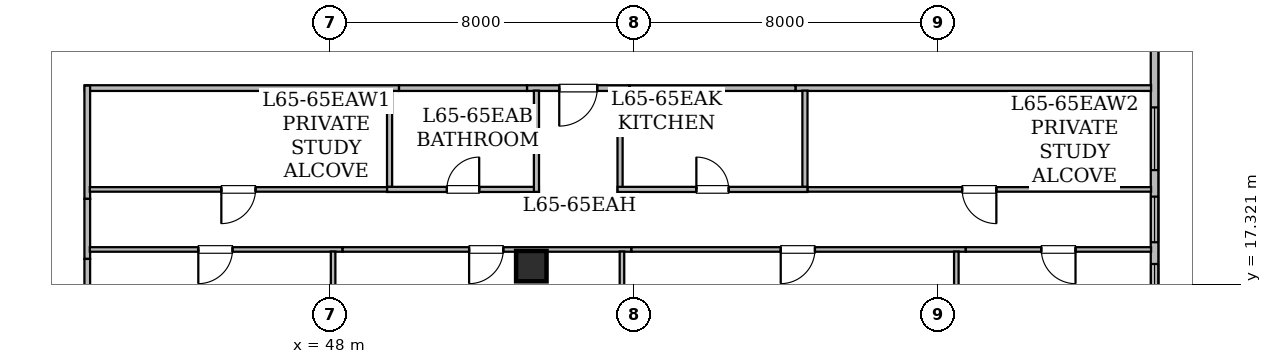
"""IFC4 building model, lengths in metres.
Left out: names, types, materials, properties, quantities, classifications, styles, units other than length and angle.
Written with IfcOpenShell. Run it as: python <this file> out.ifc"""

import sys

from ifc_helpers import new_model, si_unit, direction, frame, frame_2d, origin, origin_2d, place, context, subcontext, project, spatial, rectangle, hollow_rectangle, extrude, element, fill, save


model = new_model("IFC4")
c1 = context("Model", 3, precision=1e-05, world=origin(), true_north=direction((0.0, 1.0)))
c2 = subcontext(c1, "Body", "Model", "MODEL_VIEW")
j1 = project(units=[si_unit("LENGTHUNIT", "METRE"), si_unit("PLANEANGLEUNIT", "RADIAN")], contexts=[c1])
p1 = place(None, origin())
s1 = spatial("IfcSite", under=j1, at=p1, CompositionType="ELEMENT")
p2 = place(p1, origin())
s2 = spatial("IfcBuilding", under=s1, at=p2, CompositionType="ELEMENT")
p3 = place(p2, frame((0.0, 0.0, 253.7)))
s3 = spatial("IfcBuildingStorey", under=s2, at=p3, CompositionType="ELEMENT", Elevation=253.7)
for number, where, z_axis, x_axis in (
    (1, (67.2, 21.425, 0.0), (0.0, 0.0, 1.0), (1.0, 0.0, 0.0)),
    (2, (53.3, 17.8, 0.0), (0.0, 0.0, 1.0), (1.0, 0.0, 0.0)),
):
    element("IfcColumn", number, at=place(p3, frame(where, z_axis=z_axis, x_axis=x_axis)), inside=s3, PredefinedType="COLUMN", context=c2, shape_type="SweptSolid", body=[
        extrude(hollow_rectangle(XDim=0.8, YDim=0.8, WallThickness=0.04, at=origin_2d()), origin(), (0.0, 0.0, 1.0), 3.65),
    ])
p4 = place(p3, frame((69.7, 24.916, 0.0), z_axis=(0.0, 0.0, 1.0), x_axis=(0.0, -1.0, 0.0)))
e3 = element("IfcWall", 3, at=p4, inside=s3, PredefinedType="STANDARD", context=c2, shape_type="SweptSolid", body=[
    extrude(rectangle(XDim=8.875, YDim=0.2, at=frame_2d((4.438, 0.0))), origin(), (0.0, 0.0, 1.0), 3.43),
])
p5 = place(p4, frame((2.939, 0.0, 0.85)))
e4 = element("IfcOpeningElement", 4, at=p5, cuts=e3, PredefinedType="OPENING", context=c2, shape_type="SweptSolid", body=[
    extrude(rectangle(XDim=1.65, YDim=1.55, at=frame_2d((0.825, 0.775))), frame((0.0, 0.11, 0.0), z_axis=(0.0, -1.0, 0.0), x_axis=(1.0, 0.0, 0.0)), (0.0, 0.0, 1.0), 0.22),
])
p6 = place(p4, frame((5.287, 0.0, 0.8)))
e5 = element("IfcOpeningElement", 5, at=p6, cuts=e3, PredefinedType="OPENING", context=c2, shape_type="SweptSolid", body=[
    extrude(rectangle(XDim=1.2, YDim=1.5, at=frame_2d((0.6, 0.75))), frame((0.0, 0.11, 0.0), z_axis=(0.0, -1.0, 0.0), x_axis=(1.0, 0.0, 0.0)), (0.0, 0.0, 1.0), 0.22),
])
p7 = place(p4, frame((7.059, 0.0, 0.85)))
e6 = element("IfcOpeningElement", 6, at=p7, cuts=e3, PredefinedType="OPENING", context=c2, shape_type="SweptSolid", body=[
    extrude(rectangle(XDim=1.65, YDim=1.55, at=frame_2d((0.825, 0.775))), frame((0.0, 0.11, 0.0), z_axis=(0.0, -1.0, 0.0), x_axis=(1.0, 0.0, 0.0)), (0.0, 0.0, 1.0), 0.22),
])
p8 = place(p3, frame((49.819, 22.485, 0.0), z_axis=(0.0, 0.0, 1.0), x_axis=(-1.0, 0.0, 0.0)))
e7 = element("IfcWall", 7, at=p8, inside=s3, PredefinedType="STANDARD", context=c2, shape_type="SweptSolid", body=[
    extrude(rectangle(XDim=8.269, YDim=0.15, at=frame_2d((4.135, 0.0))), origin(), (0.0, 0.0, 1.0), 3.43),
])
p9 = place(p3, frame((41.615, 22.55, 0.0), z_axis=(0.0, 0.0, 1.0), x_axis=(0.0, -1.0, 0.0)))
e8 = element("IfcWall", 8, at=p9, inside=s3, PredefinedType="STANDARD", context=c2, shape_type="SweptSolid", body=[
    extrude(rectangle(XDim=2.98, YDim=0.15, at=frame_2d((1.49, 0.0))), origin(), (0.0, 0.0, 1.0), 3.43),
])
p10 = place(p3, frame((69.608, 22.485, 0.0), z_axis=(0.0, 0.0, 1.0), x_axis=(-1.0, 0.0, 0.0)))
e9 = element("IfcWall", 9, at=p10, inside=s3, PredefinedType="STANDARD", context=c2, shape_type="SweptSolid", body=[
    extrude(rectangle(XDim=9.357, YDim=0.15, at=frame_2d((4.678, 0.0))), origin(), (0.0, 0.0, 1.0), 2.887),
])
p11 = place(p3, frame((55.884, 22.485, 0.0), z_axis=(0.0, 0.0, 1.0), x_axis=(-1.0, 0.0, 0.0)))
e10 = element("IfcWall", 10, at=p11, inside=s3, PredefinedType="STANDARD", context=c2, shape_type="SweptSolid", body=[
    extrude(rectangle(XDim=2.698, YDim=0.15, at=frame_2d((1.349, 0.0))), origin(), (0.0, 0.0, 1.0), 2.725),
])
p12 = place(p11, frame((0.849, 0.0, 0.0)))
e11 = element("IfcOpeningElement", 11, at=p12, cuts=e10, PredefinedType="OPENING", context=c2, shape_type="SweptSolid", body=[
    extrude(rectangle(XDim=1.0, YDim=2.15, at=frame_2d((0.5, 1.075))), frame((0.0, 0.085, 0.0), z_axis=(0.0, -1.0, 0.0), x_axis=(1.0, 0.0, 0.0)), (0.0, 0.0, 1.0), 0.17),
])
p13 = place(p3, frame((41.615, 19.57, 0.0), z_axis=(0.0, 0.0, 1.0), x_axis=(0.0, -1.0, 0.0)))
e12 = element("IfcWall", 12, at=p13, inside=s3, PredefinedType="STANDARD", context=c2, shape_type="SweptSolid", body=[
    extrude(rectangle(XDim=1.58, YDim=0.15, at=frame_2d((0.79, 0.0))), origin(), (0.0, 0.0, 1.0), 2.725),
])
p14 = place(p3, frame((53.186, 22.485, 0.0), z_axis=(0.0, 0.0, 1.0), x_axis=(-1.0, 0.0, 0.0)))
e13 = element("IfcWall", 13, at=p14, inside=s3, PredefinedType="STANDARD", context=c2, shape_type="SweptSolid", body=[
    extrude(rectangle(XDim=3.367, YDim=0.15, at=frame_2d((1.684, 0.0))), origin(), (0.0, 0.0, 1.0), 2.725),
])
p15 = place(p3, frame((60.251, 22.485, 0.0), z_axis=(0.0, 0.0, 1.0), x_axis=(-1.0, 0.0, 0.0)))
e14 = element("IfcWall", 14, at=p15, inside=s3, PredefinedType="STANDARD", context=c2, shape_type="SweptSolid", body=[
    extrude(rectangle(XDim=4.367, YDim=0.15, at=frame_2d((2.184, 0.0))), origin(), (0.0, 0.0, 1.0), 3.43),
])
p16 = place(p3, frame((41.615, 17.99, 0.0), z_axis=(0.0, 0.0, 1.0), x_axis=(0.0, -1.0, 0.0)))
e15 = element("IfcWall", 15, at=p16, inside=s3, PredefinedType="STANDARD", context=c2, shape_type="SweptSolid", body=[
    extrude(rectangle(XDim=1.09, YDim=0.15, at=frame_2d((0.545, 0.0))), origin(), (0.0, 0.0, 1.0), 2.725),
])
p17 = place(p3, frame((49.505, 19.819, 0.0), z_axis=(0.0, 0.0, 1.0), x_axis=(-1.0, 0.0, 0.0)))
e16 = element("IfcWall", 16, at=p17, inside=s3, PredefinedType="PARTITIONING", context=c2, shape_type="SweptSolid", body=[
    extrude(rectangle(XDim=7.823, YDim=0.12, at=frame_2d((3.912, 0.0))), origin(), (0.0, 0.0, 1.0), 3.43),
])
p18 = place(p17, frame((3.462, 0.0, 0.0)))
e17 = element("IfcOpeningElement", 17, at=p18, cuts=e16, PredefinedType="OPENING", context=c2, shape_type="SweptSolid", body=[
    extrude(rectangle(XDim=0.9, YDim=2.1, at=frame_2d((0.45, 1.05))), frame((0.0, 0.07, 0.0), z_axis=(0.0, -1.0, 0.0), x_axis=(1.0, 0.0, 0.0)), (0.0, 0.0, 1.0), 0.14),
])
p19 = place(p3, frame((49.57, 22.418, 0.0), z_axis=(0.0, 0.0, 1.0), x_axis=(0.0, -1.0, 0.0)))
e18 = element("IfcWall", 18, at=p19, inside=s3, PredefinedType="PARTITIONING", context=c2, shape_type="SweptSolid", body=[
    extrude(rectangle(XDim=2.534, YDim=0.135, at=frame_2d((1.267, 0.0))), origin(), (0.0, 0.0, 1.0), 3.43),
])
p20 = place(p3, frame((69.608, 19.819, 0.0), z_axis=(0.0, 0.0, 1.0), x_axis=(-1.0, 0.0, 0.0)))
e19 = element("IfcWall", 19, at=p20, inside=s3, PredefinedType="PARTITIONING", context=c2, shape_type="SweptSolid", body=[
    extrude(rectangle(XDim=9.043, YDim=0.12, at=frame_2d((4.521, 0.0))), origin(), (0.0, 0.0, 1.0), 2.725),
])
p21 = place(p20, frame((4.071, 0.0, 0.0)))
e20 = element("IfcOpeningElement", 20, at=p21, cuts=e19, PredefinedType="OPENING", context=c2, shape_type="SweptSolid", body=[
    extrude(rectangle(XDim=0.9, YDim=2.1, at=frame_2d((0.45, 1.05))), frame((0.0, 0.07, 0.0), z_axis=(0.0, -1.0, 0.0), x_axis=(1.0, 0.0, 0.0)), (0.0, 0.0, 1.0), 0.14),
])
p22 = place(p3, frame((60.5, 19.884, 0.0), z_axis=(0.0, 0.0, 1.0), x_axis=(0.0, 1.0, 0.0)))
e21 = element("IfcWall", 21, at=p22, inside=s3, PredefinedType="PARTITIONING", context=c2, shape_type="SweptSolid", body=[
    extrude(rectangle(XDim=2.534, YDim=0.135, at=frame_2d((1.267, 0.0))), origin(), (0.0, 0.0, 1.0), 3.43),
])
p23 = place(p3, frame((49.505, 19.819, 0.0), z_axis=(0.0, 0.0, 1.0), x_axis=(1.0, 0.0, 0.0)))
e22 = element("IfcWall", 22, at=p23, inside=s3, PredefinedType="PARTITIONING", context=c2, shape_type="SweptSolid", body=[
    extrude(rectangle(XDim=3.995, YDim=0.135, at=frame_2d((1.998, 0.0))), origin(), (0.0, 0.0, 1.0), 2.725),
])
p24 = place(p23, frame((1.573, 0.0, 0.0)))
e23 = element("IfcOpeningElement", 23, at=p24, cuts=e22, PredefinedType="OPENING", context=c2, shape_type="SweptSolid", body=[
    extrude(rectangle(XDim=0.85, YDim=2.1, at=frame_2d((0.425, 1.05))), frame((0.0, 0.077, 0.0), z_axis=(0.0, -1.0, 0.0), x_axis=(1.0, 0.0, 0.0)), (0.0, 0.0, 1.0), 0.155),
])
p25 = place(p3, frame((53.435, 19.754, 0.0), z_axis=(0.0, 0.0, 1.0), x_axis=(0.0, 1.0, 0.0)))
e24 = element("IfcWall", 24, at=p25, inside=s3, PredefinedType="PARTITIONING", context=c2, shape_type="SweptSolid", body=[
    extrude(rectangle(XDim=2.664, YDim=0.135, at=frame_2d((1.332, 0.0))), origin(), (0.0, 0.0, 1.0), 2.725),
])
p26 = place(p3, frame((55.635, 22.418, 0.0), z_axis=(0.0, 0.0, 1.0), x_axis=(0.0, -1.0, 0.0)))
e25 = element("IfcWall", 25, at=p26, inside=s3, PredefinedType="PARTITIONING", context=c2, shape_type="SweptSolid", body=[
    extrude(rectangle(XDim=2.664, YDim=0.135, at=frame_2d((1.332, 0.0))), origin(), (0.0, 0.0, 1.0), 3.43),
])
p27 = place(p3, frame((55.57, 19.819, 0.0), z_axis=(0.0, 0.0, 1.0), x_axis=(1.0, 0.0, 0.0)))
e26 = element("IfcWall", 26, at=p27, inside=s3, PredefinedType="PARTITIONING", context=c2, shape_type="SweptSolid", body=[
    extrude(rectangle(XDim=4.995, YDim=0.135, at=frame_2d((2.498, 0.0))), origin(), (0.0, 0.0, 1.0), 2.725),
])
p28 = place(p27, frame((2.073, 0.0, 0.0)))
e27 = element("IfcOpeningElement", 27, at=p28, cuts=e26, PredefinedType="OPENING", context=c2, shape_type="SweptSolid", body=[
    extrude(rectangle(XDim=0.85, YDim=2.1, at=frame_2d((0.425, 1.05))), frame((0.0, 0.077, 0.0), z_axis=(0.0, -1.0, 0.0), x_axis=(1.0, 0.0, 0.0)), (0.0, 0.0, 1.0), 0.155),
])
p29 = place(p3, frame((48.333, 18.239, 0.0), z_axis=(0.0, 0.0, 1.0), x_axis=(-1.0, 0.0, 0.0)))
e28 = element("IfcWall", 28, at=p29, inside=s3, PredefinedType="PARTITIONING", context=c2, shape_type="SweptSolid", body=[
    extrude(rectangle(XDim=6.651, YDim=0.12, at=frame_2d((3.326, 0.0))), origin(), (0.0, 0.0, 1.0), 2.725),
])
p30 = place(p29, frame((2.896, 0.0, 0.0)))
e29 = element("IfcOpeningElement", 29, at=p30, cuts=e28, PredefinedType="OPENING", context=c2, shape_type="SweptSolid", body=[
    extrude(rectangle(XDim=0.9, YDim=2.1, at=frame_2d((0.45, 1.05))), frame((0.0, 0.07, 0.0), z_axis=(0.0, -1.0, 0.0), x_axis=(1.0, 0.0, 0.0)), (0.0, 0.0, 1.0), 0.14),
])
p31 = place(p3, frame((55.934, 18.239, 0.0), z_axis=(0.0, 0.0, 1.0), x_axis=(-1.0, 0.0, 0.0)))
e30 = element("IfcWall", 30, at=p31, inside=s3, PredefinedType="PARTITIONING", context=c2, shape_type="SweptSolid", body=[
    extrude(rectangle(XDim=7.601, YDim=0.12, at=frame_2d((3.801, 0.0))), origin(), (0.0, 0.0, 1.0), 2.725),
])
p32 = place(p31, frame((3.371, 0.0, 0.0)))
e31 = element("IfcOpeningElement", 31, at=p32, cuts=e30, PredefinedType="OPENING", context=c2, shape_type="SweptSolid", body=[
    extrude(rectangle(XDim=0.9, YDim=2.1, at=frame_2d((0.45, 1.05))), frame((0.0, 0.07, 0.0), z_axis=(0.0, -1.0, 0.0), x_axis=(1.0, 0.0, 0.0)), (0.0, 0.0, 1.0), 0.14),
])
p33 = place(p3, frame((64.733, 18.239, 0.0), z_axis=(0.0, 0.0, 1.0), x_axis=(-1.0, 0.0, 0.0)))
e32 = element("IfcWall", 32, at=p33, inside=s3, PredefinedType="PARTITIONING", context=c2, shape_type="SweptSolid", body=[
    extrude(rectangle(XDim=8.799, YDim=0.12, at=frame_2d((4.399, 0.0))), origin(), (0.0, 0.0, 1.0), 2.725),
])
p34 = place(p33, frame((3.97, 0.0, 0.0)))
e33 = element("IfcOpeningElement", 33, at=p34, cuts=e32, PredefinedType="OPENING", context=c2, shape_type="SweptSolid", body=[
    extrude(rectangle(XDim=0.9, YDim=2.1, at=frame_2d((0.45, 1.05))), frame((0.0, 0.07, 0.0), z_axis=(0.0, -1.0, 0.0), x_axis=(1.0, 0.0, 0.0)), (0.0, 0.0, 1.0), 0.14),
])
p35 = place(p3, frame((69.608, 18.239, 0.0), z_axis=(0.0, 0.0, 1.0), x_axis=(-1.0, 0.0, 0.0)))
e34 = element("IfcWall", 34, at=p35, inside=s3, PredefinedType="PARTITIONING", context=c2, shape_type="SweptSolid", body=[
    extrude(rectangle(XDim=4.875, YDim=0.12, at=frame_2d((2.438, 0.0))), origin(), (0.0, 0.0, 1.0), 2.887),
])
p36 = place(p35, frame((1.988, 0.0, 0.0)))
e35 = element("IfcOpeningElement", 35, at=p36, cuts=e34, PredefinedType="OPENING", context=c2, shape_type="SweptSolid", body=[
    extrude(rectangle(XDim=0.9, YDim=2.1, at=frame_2d((0.45, 1.05))), frame((0.0, 0.07, 0.0), z_axis=(0.0, -1.0, 0.0), x_axis=(1.0, 0.0, 0.0)), (0.0, 0.0, 1.0), 0.14),
])
for number, where, z_axis, x_axis in (
    (36, (48.084, 18.185, 0.0), (0.0, 0.0, 1.0), (0.0, -1.0, 0.0)),
    (37, (55.685, 18.185, 0.0), (0.0, 0.0, 1.0), (0.0, -1.0, 0.0)),
):
    element("IfcWall", number, at=place(p3, frame(where, z_axis=z_axis, x_axis=x_axis)), inside=s3, PredefinedType="PARTITIONING", context=c2, shape_type="SweptSolid", body=[
        extrude(rectangle(XDim=5.993, YDim=0.12, at=frame_2d((2.997, 0.0))), origin(), (0.0, 0.0, 1.0), 2.725),
    ])
p37 = place(p3, frame((64.484, 18.185, 0.0), z_axis=(0.0, 0.0, 1.0), x_axis=(0.0, -1.0, 0.0)))
e38 = element("IfcWall", 38, at=p37, inside=s3, PredefinedType="PARTITIONING", context=c2, shape_type="SweptSolid", body=[
    extrude(rectangle(XDim=5.993, YDim=0.12, at=frame_2d((2.997, 0.0))), origin(), (0.0, 0.0, 1.0), 2.887),
])
p38 = place(p5, origin())
e39 = element("IfcWindow", 39, at=p38, inside=s3, PartitioningType="SINGLE_PANEL", PredefinedType="WINDOW", context=c2, shape_type="SweptSolid", body=[
    extrude(rectangle(XDim=1.65, YDim=1.55, at=frame_2d((0.825, 0.775))), frame((0.0, 0.03, 0.0), z_axis=(0.0, -1.0, 0.0), x_axis=(1.0, 0.0, 0.0)), (0.0, 0.0, 1.0), 0.06),
])
fill(e4, e39)
p39 = place(p6, origin())
e40 = element("IfcWindow", 40, at=p39, inside=s3, PartitioningType="SINGLE_PANEL", PredefinedType="WINDOW", context=c2, shape_type="SweptSolid", body=[
    extrude(rectangle(XDim=1.2, YDim=1.5, at=frame_2d((0.6, 0.75))), frame((0.0, 0.03, 0.0), z_axis=(0.0, -1.0, 0.0), x_axis=(1.0, 0.0, 0.0)), (0.0, 0.0, 1.0), 0.06),
])
fill(e5, e40)
p40 = place(p7, origin())
e41 = element("IfcWindow", 41, at=p40, inside=s3, PartitioningType="SINGLE_PANEL", PredefinedType="WINDOW", context=c2, shape_type="SweptSolid", body=[
    extrude(rectangle(XDim=1.65, YDim=1.55, at=frame_2d((0.825, 0.775))), frame((0.0, 0.03, 0.0), z_axis=(0.0, -1.0, 0.0), x_axis=(1.0, 0.0, 0.0)), (0.0, 0.0, 1.0), 0.06),
])
fill(e6, e41)
p41 = place(p12, origin())
e42 = element("IfcDoor", 42, at=p41, inside=s3, OperationType="SINGLE_SWING_RIGHT", PredefinedType="DOOR", context=c2, shape_type="SweptSolid", body=[
    extrude(rectangle(XDim=1.0, YDim=2.15, at=frame_2d((0.5, 1.075))), frame((0.0, 0.025, 0.0), z_axis=(0.0, -1.0, 0.0), x_axis=(1.0, 0.0, 0.0)), (0.0, 0.0, 1.0), 0.05),
])
fill(e11, e42)
p42 = place(p18, origin())
e43 = element("IfcDoor", 43, at=p42, inside=s3, OperationType="SINGLE_SWING_RIGHT", PredefinedType="DOOR", context=c2, shape_type="SweptSolid", body=[
    extrude(rectangle(XDim=0.9, YDim=2.1, at=frame_2d((0.45, 1.05))), frame((0.0, 0.025, 0.0), z_axis=(0.0, -1.0, 0.0), x_axis=(1.0, 0.0, 0.0)), (0.0, 0.0, 1.0), 0.05),
])
fill(e17, e43)
p43 = place(p21, origin())
e44 = element("IfcDoor", 44, at=p43, inside=s3, OperationType="SINGLE_SWING_LEFT", PredefinedType="DOOR", context=c2, shape_type="SweptSolid", body=[
    extrude(rectangle(XDim=0.9, YDim=2.1, at=frame_2d((0.45, 1.05))), frame((0.0, 0.025, 0.0), z_axis=(0.0, -1.0, 0.0), x_axis=(1.0, 0.0, 0.0)), (0.0, 0.0, 1.0), 0.05),
])
fill(e20, e44)
p44 = place(p24, origin())
e45 = element("IfcDoor", 45, at=p44, inside=s3, OperationType="SINGLE_SWING_RIGHT", PredefinedType="DOOR", context=c2, shape_type="SweptSolid", body=[
    extrude(rectangle(XDim=0.85, YDim=2.1, at=frame_2d((0.425, 1.05))), frame((0.0, 0.025, 0.0), z_axis=(0.0, -1.0, 0.0), x_axis=(1.0, 0.0, 0.0)), (0.0, 0.0, 1.0), 0.05),
])
fill(e23, e45)
p45 = place(p28, origin())
e46 = element("IfcDoor", 46, at=p45, inside=s3, OperationType="SINGLE_SWING_LEFT", PredefinedType="DOOR", context=c2, shape_type="SweptSolid", body=[
    extrude(rectangle(XDim=0.85, YDim=2.1, at=frame_2d((0.425, 1.05))), frame((0.0, 0.025, 0.0), z_axis=(0.0, -1.0, 0.0), x_axis=(1.0, 0.0, 0.0)), (0.0, 0.0, 1.0), 0.05),
])
fill(e27, e46)
p46 = place(p30, origin())
e47 = element("IfcDoor", 47, at=p46, inside=s3, OperationType="SINGLE_SWING_RIGHT", PredefinedType="DOOR", context=c2, shape_type="SweptSolid", body=[
    extrude(rectangle(XDim=0.9, YDim=2.1, at=frame_2d((0.45, 1.05))), frame((0.0, 0.025, 0.0), z_axis=(0.0, -1.0, 0.0), x_axis=(1.0, 0.0, 0.0)), (0.0, 0.0, 1.0), 0.05),
])
fill(e29, e47)
p47 = place(p32, origin())
e48 = element("IfcDoor", 48, at=p47, inside=s3, OperationType="SINGLE_SWING_RIGHT", PredefinedType="DOOR", context=c2, shape_type="SweptSolid", body=[
    extrude(rectangle(XDim=0.9, YDim=2.1, at=frame_2d((0.45, 1.05))), frame((0.0, 0.025, 0.0), z_axis=(0.0, -1.0, 0.0), x_axis=(1.0, 0.0, 0.0)), (0.0, 0.0, 1.0), 0.05),
])
fill(e31, e48)
p48 = place(p34, origin())
e49 = element("IfcDoor", 49, at=p48, inside=s3, OperationType="SINGLE_SWING_RIGHT", PredefinedType="DOOR", context=c2, shape_type="SweptSolid", body=[
    extrude(rectangle(XDim=0.9, YDim=2.1, at=frame_2d((0.45, 1.05))), frame((0.0, 0.025, 0.0), z_axis=(0.0, -1.0, 0.0), x_axis=(1.0, 0.0, 0.0)), (0.0, 0.0, 1.0), 0.05),
])
fill(e33, e49)
p49 = place(p36, origin())
e50 = element("IfcDoor", 50, at=p49, inside=s3, OperationType="SINGLE_SWING_LEFT", PredefinedType="DOOR", context=c2, shape_type="SweptSolid", body=[
    extrude(rectangle(XDim=0.9, YDim=2.1, at=frame_2d((0.45, 1.05))), frame((0.0, 0.025, 0.0), z_axis=(0.0, -1.0, 0.0), x_axis=(1.0, 0.0, 0.0)), (0.0, 0.0, 1.0), 0.05),
])
fill(e35, e50)
save(model, sys.argv[1])
